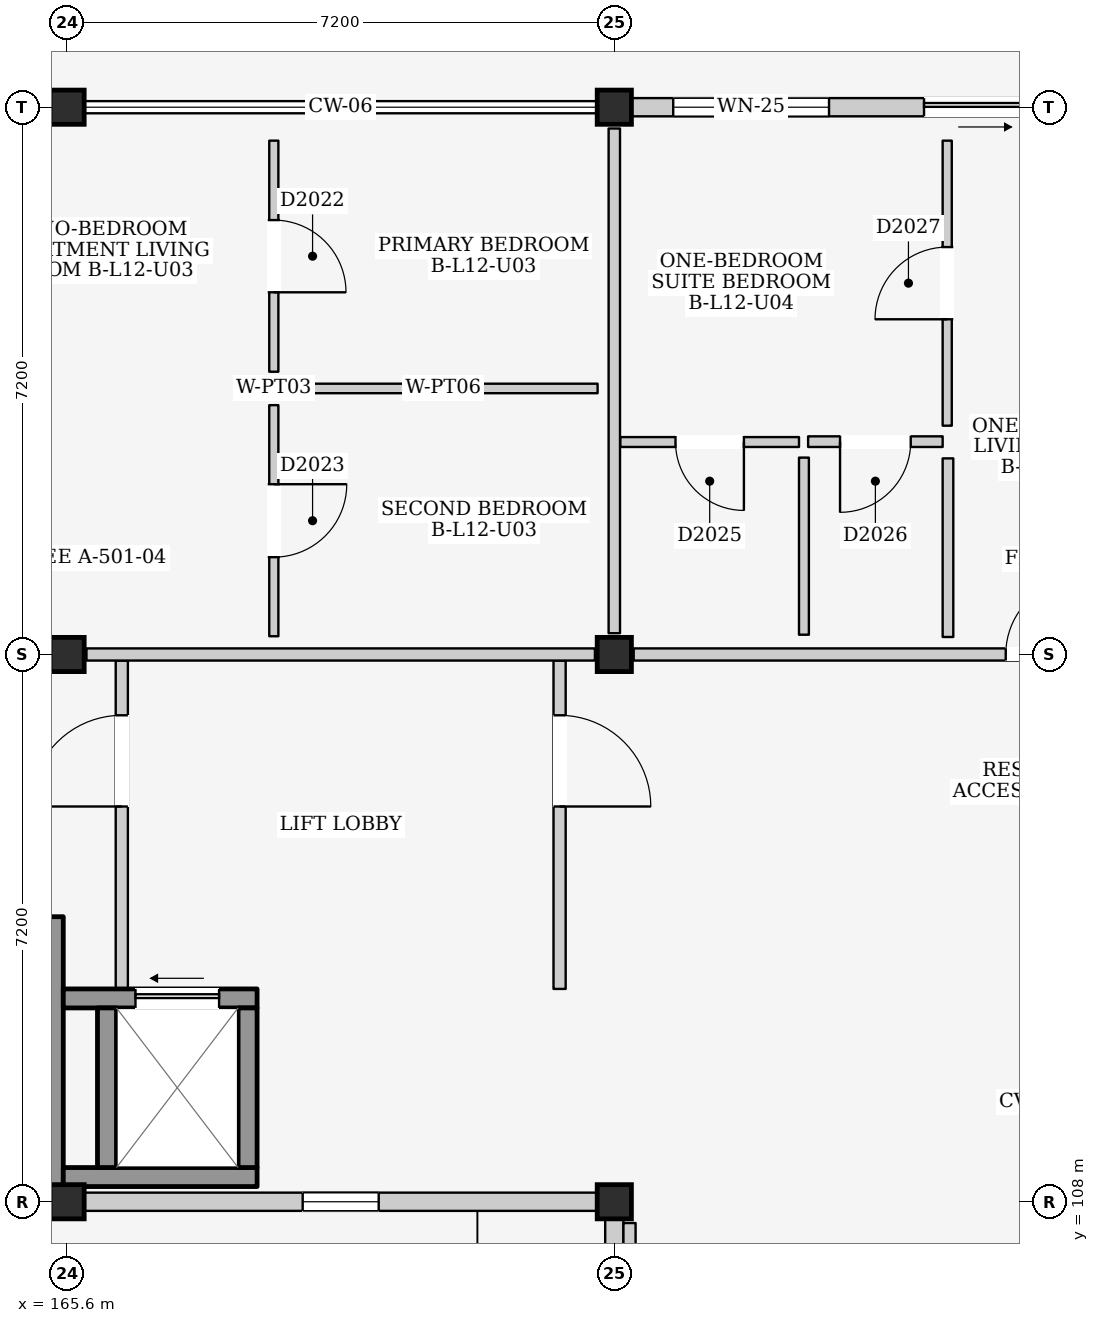
"""IFC4 building model, lengths in metres.
Left out: names, types, materials, properties, quantities, classifications, styles, units other than length and angle.
Written with IfcOpenShell. Run it as: python <this file> out.ifc"""

import sys

from ifc_helpers import new_model, si_unit, direction, frame, frame_2d, origin, origin_2d, place, context, subcontext, project, spatial, rectangle, extrude, element, fill, save


model = new_model("IFC4")
c1 = context("Model", 3, precision=1e-05, world=origin(), true_north=direction((0.0, 1.0)))
c2 = subcontext(c1, "Body", "Model", "MODEL_VIEW")
j1 = project(units=[si_unit("LENGTHUNIT", "METRE"), si_unit("PLANEANGLEUNIT", "RADIAN")], contexts=[c1])
p1 = place(None, origin())
s1 = spatial("IfcSite", under=j1, at=p1, CompositionType="ELEMENT")
p2 = place(p1, origin())
s2 = spatial("IfcBuilding", under=s1, at=p2, CompositionType="ELEMENT")
p3 = place(p2, frame((0.0, 0.0, 41.2)))
s3 = spatial("IfcBuildingStorey", under=s2, at=p3, CompositionType="ELEMENT", Elevation=41.2)
for number, where, z_axis, x_axis in (
    (1, (165.6, 108.0, 0.0), (0.0, 0.0, 1.0), (1.0, 0.0, 0.0)),
    (2, (165.6, 115.2, 0.0), (0.0, 0.0, 1.0), (1.0, 0.0, 0.0)),
    (3, (165.6, 122.4, 0.0), (0.0, 0.0, 1.0), (1.0, 0.0, 0.0)),
    (4, (172.8, 108.0, 0.0), (0.0, 0.0, 1.0), (1.0, 0.0, 0.0)),
    (5, (172.8, 115.2, 0.0), (0.0, 0.0, 1.0), (1.0, 0.0, 0.0)),
    (6, (172.8, 122.4, 0.0), (0.0, 0.0, 1.0), (1.0, 0.0, 0.0)),
):
    element("IfcColumn", number, at=place(p3, frame(where, z_axis=z_axis, x_axis=x_axis)), inside=s3, PredefinedType="COLUMN", context=c2, shape_type="SweptSolid", body=[
        extrude(rectangle(XDim=0.45, YDim=0.45, at=origin_2d()), origin(), (0.0, 0.0, 1.0), 3.2),
    ])
p4 = place(p3, frame((165.825, 108.0, 0.0), z_axis=(0.0, 0.0, 1.0), x_axis=(1.0, 0.0, 0.0)))
e7 = element("IfcWall", 7, at=p4, inside=s3, PredefinedType="ELEMENTEDWALL", context=c2, shape_type="SweptSolid", body=[
    extrude(rectangle(XDim=6.75, YDim=0.24, at=frame_2d((3.375, 0.0))), origin(), (0.0, 0.0, 1.0), 2.345),
])
p5 = place(p4, frame((2.875, 0.0, 1.2)))
e8 = element("IfcOpeningElement", 8, at=p5, cuts=e7, PredefinedType="OPENING", context=c2, shape_type="SweptSolid", body=[
    extrude(rectangle(XDim=1.0, YDim=0.9, at=frame_2d((0.5, 0.45))), frame((0.0, 0.135, 0.0), z_axis=(0.0, -1.0, 0.0), x_axis=(1.0, 0.0, 0.0)), (0.0, 0.0, 1.0), 0.27),
])
p6 = place(p3, frame((172.8, 101.025, 0.0), z_axis=(0.0, 0.0, 1.0), x_axis=(0.0, 1.0, 0.0)))
e9 = element("IfcWall", 9, at=p6, inside=s3, PredefinedType="ELEMENTEDWALL", context=c2, shape_type="SweptSolid", body=[
    extrude(rectangle(XDim=6.75, YDim=0.24, at=frame_2d((3.375, 0.0))), origin(), (0.0, 0.0, 1.0), 2.445),
])
p7 = place(p6, frame((2.5, 0.0, 0.0)))
e10 = element("IfcOpeningElement", 10, at=p7, cuts=e9, PredefinedType="OPENING", context=c2, shape_type="SweptSolid", body=[
    extrude(rectangle(XDim=1.4, YDim=2.1, at=frame_2d((0.7, 1.05))), frame((0.0, 0.135, 0.0), z_axis=(0.0, -1.0, 0.0), x_axis=(1.0, 0.0, 0.0)), (0.0, 0.0, 1.0), 0.27),
])
p8 = place(p3, frame((173.025, 122.4, 0.0), z_axis=(0.0, 0.0, 1.0), x_axis=(1.0, 0.0, 0.0)))
e11 = element("IfcWall", 11, at=p8, inside=s3, PredefinedType="ELEMENTEDWALL", context=c2, shape_type="SweptSolid", body=[
    extrude(rectangle(XDim=6.75, YDim=0.24, at=frame_2d((3.375, 0.0))), origin(), (0.0, 0.0, 1.0), 2.495),
])
p9 = place(p8, frame((3.85, 0.0, 0.0)))
e12 = element("IfcOpeningElement", 12, at=p9, cuts=e11, PredefinedType="OPENING", context=c2, shape_type="SweptSolid", body=[
    extrude(rectangle(XDim=1.6, YDim=2.12, at=frame_2d((0.8, 1.06))), frame((0.0, 0.135, 0.0), z_axis=(0.0, -1.0, 0.0), x_axis=(1.0, 0.0, 0.0)), (0.0, 0.0, 1.0), 0.27),
])
p10 = place(p8, frame((0.55, 0.0, 0.78)))
e13 = element("IfcOpeningElement", 13, at=p10, cuts=e11, PredefinedType="OPENING", context=c2, shape_type="SweptSolid", body=[
    extrude(rectangle(XDim=2.05, YDim=1.6, at=frame_2d((1.025, 0.8))), frame((0.0, 0.135, 0.0), z_axis=(0.0, -1.0, 0.0), x_axis=(1.0, 0.0, 0.0)), (0.0, 0.0, 1.0), 0.27),
])
p11 = place(p3, frame((165.4, 108.15, 0.0), z_axis=(0.0, 0.0, 1.0), x_axis=(0.0, 1.0, 0.0)))
e14 = element("IfcWall", 14, at=p11, inside=s3, PredefinedType="SHEAR", context=c2, shape_type="SweptSolid", body=[
    extrude(rectangle(XDim=3.6, YDim=0.3, at=frame_2d((1.8, 0.0))), origin(), (0.0, 0.0, 1.0), 2.95),
])
p12 = place(p3, frame((166.32, 110.8, 0.0), z_axis=(0.0, 0.0, 1.0), x_axis=(0.0, 1.0, 0.0)))
e15 = element("IfcWall", 15, at=p12, inside=s3, PredefinedType="PARTITIONING", context=c2, shape_type="SweptSolid", body=[
    extrude(rectangle(XDim=4.32, YDim=0.16, at=frame_2d((2.16, 0.0))), origin(), (0.0, 0.0, 1.0), 2.95),
])
p13 = place(p12, frame((2.4, 0.0, 0.0)))
e16 = element("IfcOpeningElement", 16, at=p13, cuts=e15, PredefinedType="OPENING", context=c2, shape_type="SweptSolid", body=[
    extrude(rectangle(XDim=1.2, YDim=2.2, at=frame_2d((0.6, 1.1))), frame((0.0, 0.095, 0.0), z_axis=(0.0, -1.0, 0.0), x_axis=(1.0, 0.0, 0.0)), (0.0, 0.0, 1.0), 0.19),
])
p14 = place(p3, frame((172.08, 110.8, 0.0), z_axis=(0.0, 0.0, 1.0), x_axis=(0.0, 1.0, 0.0)))
e17 = element("IfcWall", 17, at=p14, inside=s3, PredefinedType="PARTITIONING", context=c2, shape_type="SweptSolid", body=[
    extrude(rectangle(XDim=4.32, YDim=0.16, at=frame_2d((2.16, 0.0))), origin(), (0.0, 0.0, 1.0), 2.95),
])
p15 = place(p14, frame((2.4, 0.0, 0.0)))
e18 = element("IfcOpeningElement", 18, at=p15, cuts=e17, PredefinedType="OPENING", context=c2, shape_type="SweptSolid", body=[
    extrude(rectangle(XDim=1.2, YDim=2.2, at=frame_2d((0.6, 1.1))), frame((0.0, 0.095, 0.0), z_axis=(0.0, -1.0, 0.0), x_axis=(1.0, 0.0, 0.0)), (0.0, 0.0, 1.0), 0.19),
])
p16 = place(p3, frame((165.55, 108.325, 0.0), z_axis=(0.0, 0.0, 1.0), x_axis=(1.0, 0.0, 0.0)))
e19 = element("IfcWall", 19, at=p16, inside=s3, PredefinedType="SHEAR", context=c2, shape_type="SweptSolid", body=[
    extrude(rectangle(XDim=2.55, YDim=0.25, at=frame_2d((1.275, 0.0))), origin(), (0.0, 0.0, 1.0), 2.95),
])
p17 = place(p3, frame((165.55, 110.675, 0.0), z_axis=(0.0, 0.0, 1.0), x_axis=(1.0, 0.0, 0.0)))
e20 = element("IfcWall", 20, at=p17, inside=s3, PredefinedType="SHEAR", context=c2, shape_type="SweptSolid", body=[
    extrude(rectangle(XDim=2.55, YDim=0.25, at=frame_2d((1.275, 0.0))), origin(), (0.0, 0.0, 1.0), 2.95),
])
p18 = place(p17, frame((0.95, 0.0, 0.0)))
e21 = element("IfcOpeningElement", 21, at=p18, cuts=e20, PredefinedType="OPENING", context=c2, shape_type="SweptSolid", body=[
    extrude(rectangle(XDim=1.1, YDim=2.15, at=frame_2d((0.55, 1.075))), frame((0.0, 0.14, 0.0), z_axis=(0.0, -1.0, 0.0), x_axis=(1.0, 0.0, 0.0)), (0.0, 0.0, 1.0), 0.28),
])
for number, where, z_axis, x_axis in (
    (22, (166.125, 108.45, 0.0), (0.0, 0.0, 1.0), (0.0, 1.0, 0.0)),
    (23, (167.975, 108.45, 0.0), (0.0, 0.0, 1.0), (0.0, 1.0, 0.0)),
):
    element("IfcWall", number, at=place(p3, frame(where, z_axis=z_axis, x_axis=x_axis)), inside=s3, PredefinedType="SHEAR", context=c2, shape_type="SweptSolid", body=[
        extrude(rectangle(XDim=2.1, YDim=0.25, at=frame_2d((1.05, 0.0))), origin(), (0.0, 0.0, 1.0), 2.95),
    ])
p19 = place(p3, frame((165.855, 115.2, 0.0), z_axis=(0.0, 0.0, 1.0), x_axis=(1.0, 0.0, 0.0)))
e24 = element("IfcWall", 24, at=p19, inside=s3, PredefinedType="PARTITIONING", context=c2, shape_type="SweptSolid", body=[
    extrude(rectangle(XDim=6.69, YDim=0.16, at=frame_2d((3.345, 0.0))), origin(), (0.0, 0.0, 1.0), 2.345),
])
p20 = place(p3, frame((172.8, 115.48, 0.0), z_axis=(0.0, 0.0, 1.0), x_axis=(0.0, 1.0, 0.0)))
e25 = element("IfcWall", 25, at=p20, inside=s3, PredefinedType="PARTITIONING", context=c2, shape_type="SweptSolid", body=[
    extrude(rectangle(XDim=6.64, YDim=0.15, at=frame_2d((3.32, 0.0))), origin(), (0.0, 0.0, 1.0), 2.445),
])
p21 = place(p3, frame((168.32, 118.92, 0.0), z_axis=(0.0, 0.0, 1.0), x_axis=(0.0, 1.0, 0.0)))
e26 = element("IfcWall", 26, at=p21, inside=s3, PredefinedType="PARTITIONING", context=c2, shape_type="SweptSolid", body=[
    extrude(rectangle(XDim=3.04, YDim=0.12, at=frame_2d((1.52, 0.0))), origin(), (0.0, 0.0, 1.0), 2.95),
])
p22 = place(p21, frame((1.045, 0.0, 0.0)))
e27 = element("IfcOpeningElement", 27, at=p22, cuts=e26, PredefinedType="OPENING", context=c2, shape_type="SweptSolid", body=[
    extrude(rectangle(XDim=0.95, YDim=2.15, at=frame_2d((0.475, 1.075))), frame((0.0, 0.075, 0.0), z_axis=(0.0, -1.0, 0.0), x_axis=(1.0, 0.0, 0.0)), (0.0, 0.0, 1.0), 0.15),
])
p23 = place(p3, frame((168.52, 118.7, 0.0), z_axis=(0.0, 0.0, 1.0), x_axis=(1.0, 0.0, 0.0)))
e28 = element("IfcWall", 28, at=p23, inside=s3, PredefinedType="PARTITIONING", context=c2, shape_type="SweptSolid", body=[
    extrude(rectangle(XDim=4.06, YDim=0.125, at=frame_2d((2.03, 0.0))), origin(), (0.0, 0.0, 1.0), 2.95),
])
p24 = place(p3, frame((168.32, 115.44, 0.0), z_axis=(0.0, 0.0, 1.0), x_axis=(0.0, 1.0, 0.0)))
e29 = element("IfcWall", 29, at=p24, inside=s3, PredefinedType="PARTITIONING", context=c2, shape_type="SweptSolid", body=[
    extrude(rectangle(XDim=3.04, YDim=0.12, at=frame_2d((1.52, 0.0))), origin(), (0.0, 0.0, 1.0), 2.95),
])
p25 = place(p24, frame((1.04, 0.0, 0.0)))
e30 = element("IfcOpeningElement", 30, at=p25, cuts=e29, PredefinedType="OPENING", context=c2, shape_type="SweptSolid", body=[
    extrude(rectangle(XDim=0.96, YDim=2.15, at=frame_2d((0.48, 1.075))), frame((0.0, 0.075, 0.0), z_axis=(0.0, -1.0, 0.0), x_axis=(1.0, 0.0, 0.0)), (0.0, 0.0, 1.0), 0.15),
])
p26 = place(p3, frame((173.055, 115.2, 0.0), z_axis=(0.0, 0.0, 1.0), x_axis=(1.0, 0.0, 0.0)))
e31 = element("IfcWall", 31, at=p26, inside=s3, PredefinedType="PARTITIONING", context=c2, shape_type="SweptSolid", body=[
    extrude(rectangle(XDim=6.69, YDim=0.16, at=frame_2d((3.345, 0.0))), origin(), (0.0, 0.0, 1.0), 2.345),
])
p27 = place(p26, frame((4.895, 0.0, 0.0)))
e32 = element("IfcOpeningElement", 32, at=p27, cuts=e31, PredefinedType="OPENING", context=c2, shape_type="SweptSolid", body=[
    extrude(rectangle(XDim=1.0, YDim=2.15, at=frame_2d((0.5, 1.075))), frame((0.0, 0.095, 0.0), z_axis=(0.0, -1.0, 0.0), x_axis=(1.0, 0.0, 0.0)), (0.0, 0.0, 1.0), 0.19),
])
p28 = place(p3, frame((172.88, 117.995, 0.0), z_axis=(0.0, 0.0, 1.0), x_axis=(1.0, 0.0, 0.0)))
e33 = element("IfcWall", 33, at=p28, inside=s3, PredefinedType="PARTITIONING", context=c2, shape_type="SweptSolid", body=[
    extrude(rectangle(XDim=2.35, YDim=0.13, at=frame_2d((1.175, 0.0))), origin(), (0.0, 0.0, 1.0), 2.95),
])
p29 = place(p28, frame((0.725, 0.0, 0.0)))
e34 = element("IfcOpeningElement", 34, at=p29, cuts=e33, PredefinedType="OPENING", context=c2, shape_type="SweptSolid", body=[
    extrude(rectangle(XDim=0.9, YDim=2.1, at=frame_2d((0.45, 1.05))), frame((0.0, 0.08, 0.0), z_axis=(0.0, -1.0, 0.0), x_axis=(1.0, 0.0, 0.0)), (0.0, 0.0, 1.0), 0.16),
])
p30 = place(p3, frame((175.295, 115.46, 0.0), z_axis=(0.0, 0.0, 1.0), x_axis=(0.0, 1.0, 0.0)))
e35 = element("IfcWall", 35, at=p30, inside=s3, PredefinedType="PARTITIONING", context=c2, shape_type="SweptSolid", body=[
    extrude(rectangle(XDim=2.33, YDim=0.13, at=frame_2d((1.165, 0.0))), origin(), (0.0, 0.0, 1.0), 2.95),
])
p31 = place(p3, frame((175.35, 118.0, 0.0), z_axis=(0.0, 0.0, 1.0), x_axis=(1.0, 0.0, 0.0)))
e36 = element("IfcWall", 36, at=p31, inside=s3, PredefinedType="PARTITIONING", context=c2, shape_type="SweptSolid", body=[
    extrude(rectangle(XDim=1.77, YDim=0.14, at=frame_2d((0.885, 0.0))), origin(), (0.0, 0.0, 1.0), 2.95),
])
p32 = place(p31, frame((0.42, 0.0, 0.0)))
e37 = element("IfcOpeningElement", 37, at=p32, cuts=e36, PredefinedType="OPENING", context=c2, shape_type="SweptSolid", body=[
    extrude(rectangle(XDim=0.93, YDim=2.14, at=frame_2d((0.465, 1.07))), frame((0.0, 0.085, 0.0), z_axis=(0.0, -1.0, 0.0), x_axis=(1.0, 0.0, 0.0)), (0.0, 0.0, 1.0), 0.17),
])
p33 = place(p3, frame((177.19, 115.43, 0.0), z_axis=(0.0, 0.0, 1.0), x_axis=(0.0, 1.0, 0.0)))
e38 = element("IfcWall", 38, at=p33, inside=s3, PredefinedType="PARTITIONING", context=c2, shape_type="SweptSolid", body=[
    extrude(rectangle(XDim=2.35, YDim=0.14, at=frame_2d((1.175, 0.0))), origin(), (0.0, 0.0, 1.0), 2.95),
])
p34 = place(p3, frame((177.18, 118.21, 0.0), z_axis=(0.0, 0.0, 1.0), x_axis=(0.0, 1.0, 0.0)))
e39 = element("IfcWall", 39, at=p34, inside=s3, PredefinedType="PARTITIONING", context=c2, shape_type="SweptSolid", body=[
    extrude(rectangle(XDim=3.75, YDim=0.12, at=frame_2d((1.875, 0.0))), origin(), (0.0, 0.0, 1.0), 2.95),
])
p35 = place(p34, frame((1.4, 0.0, 0.0)))
e40 = element("IfcOpeningElement", 40, at=p35, cuts=e39, PredefinedType="OPENING", context=c2, shape_type="SweptSolid", body=[
    extrude(rectangle(XDim=0.95, YDim=2.15, at=frame_2d((0.475, 1.075))), frame((0.0, 0.075, 0.0), z_axis=(0.0, -1.0, 0.0), x_axis=(1.0, 0.0, 0.0)), (0.0, 0.0, 1.0), 0.15),
])
p36 = place(p3, frame((173.0, 101.08, 0.0), z_axis=(0.0, 0.0, 1.0), x_axis=(0.0, 1.0, 0.0)))
e41 = element("IfcWall", 41, at=p36, inside=s3, PredefinedType="PARTITIONING", context=c2, shape_type="SweptSolid", body=[
    extrude(rectangle(XDim=6.64, YDim=0.16, at=frame_2d((3.32, 0.0))), origin(), (0.0, 0.0, 1.0), 2.95),
])
p37 = place(p36, frame((2.81, 0.0, 0.0)))
e42 = element("IfcOpeningElement", 42, at=p37, cuts=e41, PredefinedType="OPENING", context=c2, shape_type="SweptSolid", body=[
    extrude(rectangle(XDim=1.02, YDim=2.18, at=frame_2d((0.51, 1.09))), frame((0.0, 0.095, 0.0), z_axis=(0.0, -1.0, 0.0), x_axis=(1.0, 0.0, 0.0)), (0.0, 0.0, 1.0), 0.19),
])
p38 = place(p5, origin())
e43 = element("IfcWindow", 43, at=p38, inside=s3, PartitioningType="SINGLE_PANEL", PredefinedType="WINDOW", context=c2, shape_type="SweptSolid", body=[
    extrude(rectangle(XDim=1.0, YDim=0.9, at=frame_2d((0.5, 0.45))), frame((0.0, 0.03, 0.0), z_axis=(0.0, -1.0, 0.0), x_axis=(1.0, 0.0, 0.0)), (0.0, 0.0, 1.0), 0.06),
])
fill(e8, e43)
p39 = place(p9, frame((1.6, 0.0, 0.0), z_axis=(0.0, 0.0, 1.0), x_axis=(-1.0, 0.0, 0.0)))
e44 = element("IfcDoor", 44, at=p39, inside=s3, OperationType="SLIDING_TO_RIGHT", PredefinedType="DOOR", context=c2, shape_type="SweptSolid", body=[
    extrude(rectangle(XDim=1.6, YDim=2.12, at=frame_2d((0.8, 1.06))), frame((0.0, 0.025, 0.0), z_axis=(0.0, -1.0, 0.0), x_axis=(1.0, 0.0, 0.0)), (0.0, 0.0, 1.0), 0.05),
])
fill(e12, e44)
p40 = place(p10, origin())
e45 = element("IfcWindow", 45, at=p40, inside=s3, PartitioningType="DOUBLE_PANEL_VERTICAL", PredefinedType="WINDOW", context=c2, shape_type="SweptSolid", body=[
    extrude(rectangle(XDim=2.05, YDim=1.6, at=frame_2d((1.025, 0.8))), frame((0.0, 0.03, 0.0), z_axis=(0.0, -1.0, 0.0), x_axis=(1.0, 0.0, 0.0)), (0.0, 0.0, 1.0), 0.06),
])
fill(e13, e45)
p41 = place(p13, origin())
e46 = element("IfcDoor", 46, at=p41, inside=s3, OperationType="SINGLE_SWING_LEFT", PredefinedType="DOOR", context=c2, shape_type="SweptSolid", body=[
    extrude(rectangle(XDim=1.2, YDim=2.2, at=frame_2d((0.6, 1.1))), frame((0.0, 0.025, 0.0), z_axis=(0.0, -1.0, 0.0), x_axis=(1.0, 0.0, 0.0)), (0.0, 0.0, 1.0), 0.05),
])
fill(e16, e46)
p42 = place(p15, frame((1.2, 0.0, 0.0), z_axis=(0.0, 0.0, 1.0), x_axis=(-1.0, 0.0, 0.0)))
e47 = element("IfcDoor", 47, at=p42, inside=s3, OperationType="SINGLE_SWING_RIGHT", PredefinedType="DOOR", context=c2, shape_type="SweptSolid", body=[
    extrude(rectangle(XDim=1.2, YDim=2.2, at=frame_2d((0.6, 1.1))), frame((0.0, 0.025, 0.0), z_axis=(0.0, -1.0, 0.0), x_axis=(1.0, 0.0, 0.0)), (0.0, 0.0, 1.0), 0.05),
])
fill(e18, e47)
p43 = place(p18, origin())
e48 = element("IfcDoor", 48, at=p43, inside=s3, OperationType="SLIDING_TO_LEFT", PredefinedType="DOOR", context=c2, shape_type="SweptSolid", body=[
    extrude(rectangle(XDim=1.1, YDim=2.15, at=frame_2d((0.55, 1.075))), frame((0.0, 0.025, 0.0), z_axis=(0.0, -1.0, 0.0), x_axis=(1.0, 0.0, 0.0)), (0.0, 0.0, 1.0), 0.05),
])
fill(e21, e48)
p44 = place(p22, frame((0.95, 0.0, 0.0), z_axis=(0.0, 0.0, 1.0), x_axis=(-1.0, 0.0, 0.0)))
e49 = element("IfcDoor", 49, at=p44, inside=s3, OperationType="SINGLE_SWING_RIGHT", PredefinedType="DOOR", context=c2, shape_type="SweptSolid", body=[
    extrude(rectangle(XDim=0.95, YDim=2.15, at=frame_2d((0.475, 1.075))), frame((0.0, 0.025, 0.0), z_axis=(0.0, -1.0, 0.0), x_axis=(1.0, 0.0, 0.0)), (0.0, 0.0, 1.0), 0.05),
])
fill(e27, e49)
p45 = place(p25, frame((0.96, 0.0, 0.0), z_axis=(0.0, 0.0, 1.0), x_axis=(-1.0, 0.0, 0.0)))
e50 = element("IfcDoor", 50, at=p45, inside=s3, OperationType="SINGLE_SWING_LEFT", PredefinedType="DOOR", context=c2, shape_type="SweptSolid", body=[
    extrude(rectangle(XDim=0.96, YDim=2.15, at=frame_2d((0.48, 1.075))), frame((0.0, 0.025, 0.0), z_axis=(0.0, -1.0, 0.0), x_axis=(1.0, 0.0, 0.0)), (0.0, 0.0, 1.0), 0.05),
])
fill(e30, e50)
p46 = place(p27, origin())
e51 = element("IfcDoor", 51, at=p46, inside=s3, OperationType="SINGLE_SWING_RIGHT", PredefinedType="DOOR", context=c2, shape_type="SweptSolid", body=[
    extrude(rectangle(XDim=1.0, YDim=2.15, at=frame_2d((0.5, 1.075))), frame((0.0, 0.025, 0.0), z_axis=(0.0, -1.0, 0.0), x_axis=(1.0, 0.0, 0.0)), (0.0, 0.0, 1.0), 0.05),
])
fill(e32, e51)
p47 = place(p29, frame((0.9, 0.0, 0.0), z_axis=(0.0, 0.0, 1.0), x_axis=(-1.0, 0.0, 0.0)))
e52 = element("IfcDoor", 52, at=p47, inside=s3, OperationType="SINGLE_SWING_LEFT", PredefinedType="DOOR", context=c2, shape_type="SweptSolid", body=[
    extrude(rectangle(XDim=0.9, YDim=2.1, at=frame_2d((0.45, 1.05))), frame((0.0, 0.025, 0.0), z_axis=(0.0, -1.0, 0.0), x_axis=(1.0, 0.0, 0.0)), (0.0, 0.0, 1.0), 0.05),
])
fill(e34, e52)
p48 = place(p32, frame((0.93, 0.0, 0.0), z_axis=(0.0, 0.0, 1.0), x_axis=(-1.0, 0.0, 0.0)))
e53 = element("IfcDoor", 53, at=p48, inside=s3, OperationType="SINGLE_SWING_RIGHT", PredefinedType="DOOR", context=c2, shape_type="SweptSolid", body=[
    extrude(rectangle(XDim=0.93, YDim=2.14, at=frame_2d((0.465, 1.07))), frame((0.0, 0.025, 0.0), z_axis=(0.0, -1.0, 0.0), x_axis=(1.0, 0.0, 0.0)), (0.0, 0.0, 1.0), 0.05),
])
fill(e37, e53)
p49 = place(p35, origin())
e54 = element("IfcDoor", 54, at=p49, inside=s3, OperationType="SINGLE_SWING_LEFT", PredefinedType="DOOR", context=c2, shape_type="SweptSolid", body=[
    extrude(rectangle(XDim=0.95, YDim=2.15, at=frame_2d((0.475, 1.075))), frame((0.0, 0.025, 0.0), z_axis=(0.0, -1.0, 0.0), x_axis=(1.0, 0.0, 0.0)), (0.0, 0.0, 1.0), 0.05),
])
fill(e40, e54)
save(model, sys.argv[1])
